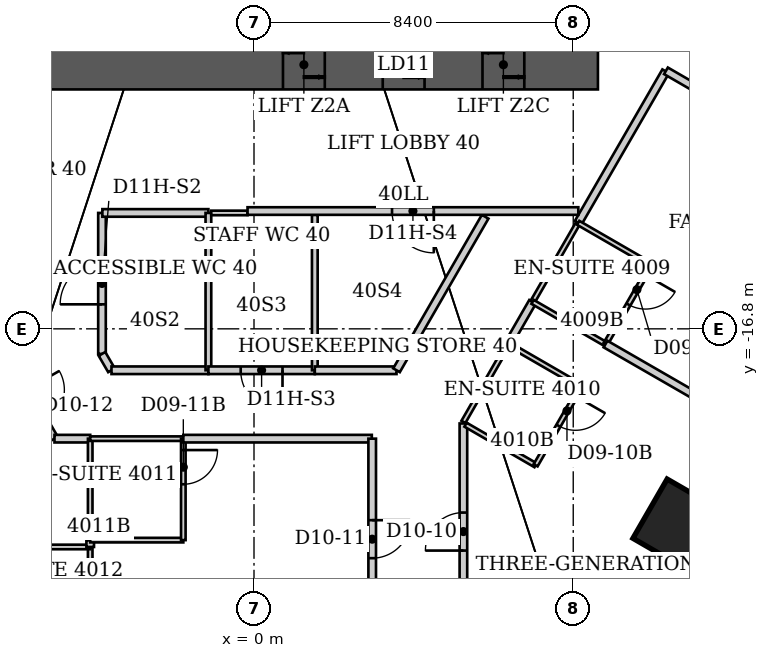
"""IFC4 building model, lengths in metres.
Left out: names, types, materials, properties, quantities, classifications, styles, units other than length and angle.
Written with IfcOpenShell. Run it as: python <this file> out.ifc"""

import sys

from ifc_helpers import new_model, si_unit, direction, frame, frame_2d, origin, origin_2d, place, context, subcontext, project, spatial, rectangle, extrude, element, fill, save


model = new_model("IFC4")
c1 = context("Model", 3, precision=1e-05, world=origin(), true_north=direction((0.0, 1.0)))
c2 = subcontext(c1, "Body", "Model", "MODEL_VIEW")
j1 = project(units=[si_unit("LENGTHUNIT", "METRE"), si_unit("PLANEANGLEUNIT", "RADIAN")], contexts=[c1])
p1 = place(None, origin())
s1 = spatial("IfcSite", under=j1, at=p1, CompositionType="ELEMENT")
p2 = place(p1, origin())
s2 = spatial("IfcBuilding", under=s1, at=p2, CompositionType="ELEMENT")
p3 = place(p2, frame((0.0, 0.0, 161.4)))
s3 = spatial("IfcBuildingStorey", under=s2, at=p3, CompositionType="ELEMENT", Elevation=161.4)
p4 = place(p3, frame((11.2, -21.983, 0.0), z_axis=(-0.025529655274, 0.050161282473, 0.998414784767), x_axis=(0.865565037486, -0.498569049576, 0.04718123236)))
e1 = element("IfcColumn", 1, at=p4, inside=s3, PredefinedType="COLUMN", context=c2, shape_type="SweptSolid", body=[
    extrude(rectangle(XDim=1.8, YDim=1.8, at=origin_2d()), origin(), (0.0, 0.0, 1.0), 3.806),
])
p5 = place(p3, frame((-9.05, -9.85, 0.0), z_axis=(0.0, 0.0, 1.0), x_axis=(1.0, 0.0, 0.0)))
e2 = element("IfcWall", 2, at=p5, inside=s3, PredefinedType="SHEAR", context=c2, shape_type="SweptSolid", body=[
    extrude(rectangle(XDim=18.1, YDim=1.3, at=frame_2d((9.05, 0.0))), origin(), (0.0, 0.0, 1.0), 3.8),
])
p6 = place(p5, frame((1.938, 0.0, 0.0)))
e3 = element("IfcOpeningElement", 3, at=p6, cuts=e2, PredefinedType="OPENING", context=c2, shape_type="SweptSolid", body=[
    extrude(rectangle(XDim=1.1, YDim=2.2, at=frame_2d((0.55, 1.1))), frame((0.0, 0.65, 0.0), z_axis=(0.0, -1.0, 0.0), x_axis=(1.0, 0.0, 0.0)), (0.0, 0.0, 1.0), 1.3),
])
p7 = place(p5, frame((9.812, 0.0, 0.0)))
e4 = element("IfcOpeningElement", 4, at=p7, cuts=e2, PredefinedType="OPENING", context=c2, shape_type="SweptSolid", body=[
    extrude(rectangle(XDim=1.1, YDim=2.1, at=frame_2d((0.55, 1.05))), frame((0.0, 0.65, 0.0), z_axis=(0.0, -1.0, 0.0), x_axis=(1.0, 0.0, 0.0)), (0.0, 0.0, 1.0), 1.3),
])
p8 = place(p5, frame((12.438, 0.0, 0.0)))
e5 = element("IfcOpeningElement", 5, at=p8, cuts=e2, PredefinedType="OPENING", context=c2, shape_type="SweptSolid", body=[
    extrude(rectangle(XDim=1.1, YDim=2.1, at=frame_2d((0.55, 1.05))), frame((0.0, 0.65, 0.0), z_axis=(0.0, -1.0, 0.0), x_axis=(1.0, 0.0, 0.0)), (0.0, 0.0, 1.0), 1.3),
])
p9 = place(p5, frame((15.062, 0.0, 0.0)))
e6 = element("IfcOpeningElement", 6, at=p9, cuts=e2, PredefinedType="OPENING", context=c2, shape_type="SweptSolid", body=[
    extrude(rectangle(XDim=1.1, YDim=2.1, at=frame_2d((0.55, 1.05))), frame((0.0, 0.65, 0.0), z_axis=(0.0, -1.0, 0.0), x_axis=(1.0, 0.0, 0.0)), (0.0, 0.0, 1.0), 1.3),
])
p10 = place(p3, frame((-6.23, -17.99, 0.0), z_axis=(0.0, 0.0, 1.0), x_axis=(0.499431599995, -0.866353321068, 0.0)))
e7 = element("IfcWall", 7, at=p10, inside=s3, PredefinedType="PARTITIONING", context=c2, shape_type="SweptSolid", body=[
    extrude(rectangle(XDim=1.962, YDim=0.2, at=frame_2d((0.981, 0.0))), origin(), (0.0, 0.0, 1.0), 3.64),
])
p11 = place(p10, frame((0.481, 0.0, 0.0)))
e8 = element("IfcOpeningElement", 8, at=p11, cuts=e7, PredefinedType="OPENING", context=c2, shape_type="SweptSolid", body=[
    extrude(rectangle(XDim=1.0, YDim=2.13, at=frame_2d((0.5, 1.065))), frame((0.0, 0.1, 0.0), z_axis=(0.0, -1.0, 0.0), x_axis=(1.0, 0.0, 0.0)), (0.0, 0.0, 1.0), 0.2),
])
p12 = place(p3, frame((-5.25, -19.69, 0.0), z_axis=(0.0, 0.0, 1.0), x_axis=(1.0, 0.0, 0.0)))
e9 = element("IfcWall", 9, at=p12, inside=s3, PredefinedType="PARTITIONING", context=c2, shape_type="SweptSolid", body=[
    extrude(rectangle(XDim=0.94, YDim=0.2, at=frame_2d((0.47, 0.0))), origin(), (0.0, 0.0, 1.0), 3.64),
])
p13 = place(p3, frame((-4.31, -24.54, 0.0), z_axis=(0.0, 0.0, 1.0), x_axis=(0.0, 1.0, 0.0)))
e10 = element("IfcWall", 10, at=p13, inside=s3, PredefinedType="PARTITIONING", context=c2, shape_type="SweptSolid", body=[
    extrude(rectangle(XDim=2.0, YDim=0.12, at=frame_2d((1.0, 0.0))), origin(), (0.0, 0.0, 1.0), 3.64),
])
p14 = place(p3, frame((-4.31, -22.54, 0.0), z_axis=(0.0, 0.0, 1.0), x_axis=(-1.0, 0.0, 0.0)))
e11 = element("IfcWall", 11, at=p14, inside=s3, PredefinedType="PARTITIONING", context=c2, shape_type="SweptSolid", body=[
    extrude(rectangle(XDim=2.4, YDim=0.12, at=frame_2d((1.2, 0.0))), origin(), (0.0, 0.0, 1.0), 3.64),
])
p15 = place(p3, frame((-4.31, -22.54, 0.0), z_axis=(0.0, 0.0, 1.0), x_axis=(0.0, 1.0, 0.0)))
e12 = element("IfcWall", 12, at=p15, inside=s3, PredefinedType="PARTITIONING", context=c2, shape_type="SweptSolid", body=[
    extrude(rectangle(XDim=0.18, YDim=0.2, at=frame_2d((0.09, 0.0))), origin(), (0.0, 0.0, 1.0), 3.64),
])
p16 = place(p3, frame((-4.31, -22.36, 0.0), z_axis=(0.0, 0.0, 1.0), x_axis=(0.0, 1.0, 0.0)))
e13 = element("IfcWall", 13, at=p16, inside=s3, PredefinedType="PARTITIONING", context=c2, shape_type="SweptSolid", body=[
    extrude(rectangle(XDim=2.67, YDim=0.12, at=frame_2d((1.335, 0.0))), origin(), (0.0, 0.0, 1.0), 3.64),
])
for number, where, z_axis, x_axis in (
    (14, (-4.31, -22.36, 0.0), (0.0, 0.0, 1.0), (1.0, 0.0, 0.0)),
    (15, (-4.31, -19.69, 0.0), (0.0, 0.0, 1.0), (1.0, 0.0, 0.0)),
):
    element("IfcWall", number, at=place(p3, frame(where, z_axis=z_axis, x_axis=x_axis)), inside=s3, PredefinedType="PARTITIONING", context=c2, shape_type="SweptSolid", body=[
        extrude(rectangle(XDim=2.45, YDim=0.12, at=frame_2d((1.225, 0.0))), origin(), (0.0, 0.0, 1.0), 3.64),
    ])
p17 = place(p3, frame((-4.0, -17.46, 0.0), z_axis=(0.0, 0.0, 1.0), x_axis=(0.0, 1.0, 0.0)))
e16 = element("IfcWall", 16, at=p17, inside=s3, PredefinedType="PARTITIONING", context=c2, shape_type="SweptSolid", body=[
    extrude(rectangle(XDim=3.71, YDim=0.2, at=frame_2d((1.855, 0.0))), origin(), (0.0, 0.0, 1.0), 3.64),
])
p18 = place(p17, frame((1.305, 0.0, 0.0)))
e17 = element("IfcOpeningElement", 17, at=p18, cuts=e16, PredefinedType="OPENING", context=c2, shape_type="SweptSolid", body=[
    extrude(rectangle(XDim=1.1, YDim=2.2, at=frame_2d((0.55, 1.1))), frame((0.0, 0.1, 0.0), z_axis=(0.0, -1.0, 0.0), x_axis=(1.0, 0.0, 0.0)), (0.0, 0.0, 1.0), 0.2),
])
p19 = place(p3, frame((-3.99, -13.75, 0.0), z_axis=(0.0, 0.0, 1.0), x_axis=(1.0, 0.0, 0.0)))
e18 = element("IfcWall", 18, at=p19, inside=s3, PredefinedType="PARTITIONING", context=c2, shape_type="SweptSolid", body=[
    extrude(rectangle(XDim=2.79, YDim=0.2, at=frame_2d((1.395, 0.0))), origin(), (0.0, 0.0, 1.0), 3.64),
])
p20 = place(p3, frame((-3.75, -17.89, 0.0), z_axis=(0.0, 0.0, 1.0), x_axis=(-0.502680181512, 0.864472460588, 0.0)))
e19 = element("IfcWall", 19, at=p20, inside=s3, PredefinedType="PARTITIONING", context=c2, shape_type="SweptSolid", body=[
    extrude(rectangle(XDim=0.497, YDim=0.2, at=frame_2d((0.249, 0.0))), origin(), (0.0, 0.0, 1.0), 3.64),
])
p21 = place(p3, frame((-1.86, -22.36, 0.0), z_axis=(0.0, 0.0, 1.0), x_axis=(0.0, 1.0, 0.0)))
e20 = element("IfcWall", 20, at=p21, inside=s3, PredefinedType="PARTITIONING", context=c2, shape_type="SweptSolid", body=[
    extrude(rectangle(XDim=2.67, YDim=0.12, at=frame_2d((1.335, 0.0))), origin(), (0.0, 0.0, 1.0), 2.86),
])
p22 = place(p21, frame((1.47, 0.0, 0.0)))
e21 = element("IfcOpeningElement", 21, at=p22, cuts=e20, PredefinedType="OPENING", context=c2, shape_type="SweptSolid", body=[
    extrude(rectangle(XDim=0.9, YDim=2.03, at=frame_2d((0.45, 1.015))), frame((0.0, 0.06, 0.0), z_axis=(0.0, -1.0, 0.0), x_axis=(1.0, 0.0, 0.0)), (0.0, 0.0, 1.0), 0.12),
])
p23 = place(p3, frame((-1.86, -19.69, 0.0), z_axis=(0.0, 0.0, 1.0), x_axis=(1.0, 0.0, 0.0)))
e22 = element("IfcWall", 22, at=p23, inside=s3, PredefinedType="PARTITIONING", context=c2, shape_type="SweptSolid", body=[
    extrude(rectangle(XDim=4.96, YDim=0.2, at=frame_2d((2.48, 0.0))), origin(), (0.0, 0.0, 1.0), 3.64),
])
p24 = place(p3, frame((-1.2, -17.89, 0.0), z_axis=(0.0, 0.0, 1.0), x_axis=(-1.0, 0.0, 0.0)))
e23 = element("IfcWall", 23, at=p24, inside=s3, PredefinedType="PARTITIONING", context=c2, shape_type="SweptSolid", body=[
    extrude(rectangle(XDim=2.55, YDim=0.2, at=frame_2d((1.275, 0.0))), origin(), (0.0, 0.0, 1.0), 3.64),
])
p25 = place(p3, frame((-1.2, -13.75, 0.0), z_axis=(0.0, 0.0, 1.0), x_axis=(0.0, -1.0, 0.0)))
e24 = element("IfcWall", 24, at=p25, inside=s3, PredefinedType="PARTITIONING", context=c2, shape_type="SweptSolid", body=[
    extrude(rectangle(XDim=4.14, YDim=0.15, at=frame_2d((2.07, 0.0))), origin(), (0.0, 0.0, 1.0), 3.64),
])
p26 = place(p3, frame((-1.125, -13.75, 0.0), z_axis=(0.0, 0.0, 1.0), x_axis=(1.0, 0.0, 0.0)))
e25 = element("IfcWall", 25, at=p26, inside=s3, PredefinedType="PARTITIONING", context=c2, shape_type="SweptSolid", body=[
    extrude(rectangle(XDim=0.955, YDim=0.12, at=frame_2d((0.478, 0.0))), origin(), (0.0, 0.0, 1.0), 3.64),
])
p27 = place(p3, frame((1.6, -17.89, 0.0), z_axis=(0.0, 0.0, 1.0), x_axis=(-1.0, 0.0, 0.0)))
e26 = element("IfcWall", 26, at=p27, inside=s3, PredefinedType="PARTITIONING", context=c2, shape_type="SweptSolid", body=[
    extrude(rectangle(XDim=2.8, YDim=0.2, at=frame_2d((1.4, 0.0))), origin(), (0.0, 0.0, 1.0), 3.64),
])
p28 = place(p27, frame((0.85, 0.0, 0.0)))
e27 = element("IfcOpeningElement", 27, at=p28, cuts=e26, PredefinedType="OPENING", context=c2, shape_type="SweptSolid", body=[
    extrude(rectangle(XDim=1.1, YDim=2.2, at=frame_2d((0.55, 1.1))), frame((0.0, 0.1, 0.0), z_axis=(0.0, -1.0, 0.0), x_axis=(1.0, 0.0, 0.0)), (0.0, 0.0, 1.0), 0.2),
])
p29 = place(p3, frame((1.6, -13.8, 0.0), z_axis=(0.0, 0.0, 1.0), x_axis=(0.0, -1.0, 0.0)))
e28 = element("IfcWall", 28, at=p29, inside=s3, PredefinedType="PARTITIONING", context=c2, shape_type="SweptSolid", body=[
    extrude(rectangle(XDim=4.09, YDim=0.15, at=frame_2d((2.045, 0.0))), origin(), (0.0, 0.0, 1.0), 3.64),
])
p30 = place(p3, frame((3.11, -19.69, 0.0), z_axis=(0.0, 0.0, 1.0), x_axis=(0.0, -1.0, 0.0)))
e29 = element("IfcWall", 29, at=p30, inside=s3, PredefinedType="PARTITIONING", context=c2, shape_type="SweptSolid", body=[
    extrude(rectangle(XDim=5.29, YDim=0.2, at=frame_2d((2.645, 0.0))), origin(), (0.0, 0.0, 1.0), 3.64),
])
p31 = place(p30, frame((2.145, 0.0, 0.0)))
e30 = element("IfcOpeningElement", 30, at=p31, cuts=e29, PredefinedType="OPENING", context=c2, shape_type="SweptSolid", body=[
    extrude(rectangle(XDim=1.0, YDim=2.13, at=frame_2d((0.5, 1.065))), frame((0.0, 0.1, 0.0), z_axis=(0.0, -1.0, 0.0), x_axis=(1.0, 0.0, 0.0)), (0.0, 0.0, 1.0), 0.2),
])
p32 = place(p3, frame((3.75, -17.89, 0.0), z_axis=(0.0, 0.0, 1.0), x_axis=(-1.0, 0.0, 0.0)))
e31 = element("IfcWall", 31, at=p32, inside=s3, PredefinedType="PARTITIONING", context=c2, shape_type="SweptSolid", body=[
    extrude(rectangle(XDim=2.15, YDim=0.2, at=frame_2d((1.075, 0.0))), origin(), (0.0, 0.0, 1.0), 3.64),
])
p33 = place(p3, frame((5.51, -24.98, 0.0), z_axis=(0.0, 0.0, 1.0), x_axis=(0.0, 1.0, 0.0)))
e32 = element("IfcWall", 32, at=p33, inside=s3, PredefinedType="PARTITIONING", context=c2, shape_type="SweptSolid", body=[
    extrude(rectangle(XDim=5.69, YDim=0.2, at=frame_2d((2.845, 0.0))), origin(), (0.0, 0.0, 1.0), 3.64),
])
p34 = place(p33, frame((2.345, 0.0, 0.0)))
e33 = element("IfcOpeningElement", 33, at=p34, cuts=e32, PredefinedType="OPENING", context=c2, shape_type="SweptSolid", body=[
    extrude(rectangle(XDim=1.0, YDim=2.13, at=frame_2d((0.5, 1.065))), frame((0.0, 0.1, 0.0), z_axis=(0.0, -1.0, 0.0), x_axis=(1.0, 0.0, 0.0)), (0.0, 0.0, 1.0), 0.2),
])
p35 = place(p3, frame((5.51, -19.25, 0.0), z_axis=(0.0, 0.0, 1.0), x_axis=(0.498837591974, 0.866695481028, 0.0)))
e34 = element("IfcWall", 34, at=p35, inside=s3, PredefinedType="PARTITIONING", context=c2, shape_type="SweptSolid", body=[
    extrude(rectangle(XDim=2.365, YDim=0.12, at=frame_2d((1.183, 0.0))), origin(), (0.0, 0.0, 1.0), 3.64),
])
p36 = place(p3, frame((5.566, -19.323, 0.0), z_axis=(0.0, 0.0, 1.0), x_axis=(0.865436746432, -0.501018201192, 0.0)))
e35 = element("IfcWall", 35, at=p36, inside=s3, PredefinedType="PARTITIONING", context=c2, shape_type="SweptSolid", body=[
    extrude(rectangle(XDim=2.13, YDim=0.12, at=frame_2d((1.065, 0.0))), origin(), (0.0, 0.0, 1.0), 3.64),
])
p37 = place(p3, frame((6.083, -13.85, 0.0), z_axis=(0.0, 0.0, 1.0), x_axis=(-0.499977643516, -0.866038310922, 0.0)))
e36 = element("IfcWall", 36, at=p37, inside=s3, PredefinedType="PARTITIONING", context=c2, shape_type="SweptSolid", body=[
    extrude(rectangle(XDim=4.665, YDim=0.2, at=frame_2d((2.333, 0.0))), origin(), (0.0, 0.0, 1.0), 3.64),
])
p38 = place(p3, frame((6.69, -17.2, 0.0), z_axis=(0.0, 0.0, 1.0), x_axis=(0.499623473928, 0.866242682105, 0.0)))
e37 = element("IfcWall", 37, at=p38, inside=s3, PredefinedType="PARTITIONING", context=c2, shape_type="SweptSolid", body=[
    extrude(rectangle(XDim=1.281, YDim=0.2, at=frame_2d((0.641, 0.0))), origin(), (0.0, 0.0, 1.0), 3.64),
])
p39 = place(p3, frame((7.33, -16.09, 0.0), z_axis=(0.0, 0.0, 1.0), x_axis=(0.499693115345, 0.866202511239, 0.0)))
e38 = element("IfcWall", 38, at=p39, inside=s3, PredefinedType="PARTITIONING", context=c2, shape_type="SweptSolid", body=[
    extrude(rectangle(XDim=2.401, YDim=0.12, at=frame_2d((1.201, 0.0))), origin(), (0.0, 0.0, 1.0), 3.64),
])
p40 = place(p3, frame((7.33, -16.09, 0.0), z_axis=(0.0, 0.0, 1.0), x_axis=(0.86575271903, -0.500472006703, 0.0)))
e39 = element("IfcWall", 39, at=p40, inside=s3, PredefinedType="PARTITIONING", context=c2, shape_type="SweptSolid", body=[
    extrude(rectangle(XDim=2.218, YDim=0.12, at=frame_2d((1.109, 0.0))), origin(), (0.0, 0.0, 1.0), 3.64),
])
p41 = place(p3, frame((7.41, -20.39, 0.0), z_axis=(0.0, 0.0, 1.0), x_axis=(0.499737123639, 0.866177122335, 0.0)))
e40 = element("IfcWall", 40, at=p41, inside=s3, PredefinedType="PARTITIONING", context=c2, shape_type="SweptSolid", body=[
    extrude(rectangle(XDim=2.401, YDim=0.12, at=frame_2d((1.201, 0.0))), origin(), (0.0, 0.0, 1.0), 3.64),
])
p42 = place(p41, frame((1.201, 0.0, 0.0)))
e41 = element("IfcOpeningElement", 41, at=p42, cuts=e40, PredefinedType="OPENING", context=c2, shape_type="SweptSolid", body=[
    extrude(rectangle(XDim=0.9, YDim=2.03, at=frame_2d((0.45, 1.015))), frame((0.0, 0.06, 0.0), z_axis=(0.0, -1.0, 0.0), x_axis=(1.0, 0.0, 0.0)), (0.0, 0.0, 1.0), 0.12),
])
p43 = place(p3, frame((8.53, -14.01, 0.0), z_axis=(0.0, 0.0, 1.0), x_axis=(0.500091179446, 0.865972754907, 0.0)))
e42 = element("IfcWall", 42, at=p43, inside=s3, PredefinedType="PARTITIONING", context=c2, shape_type="SweptSolid", body=[
    extrude(rectangle(XDim=4.604, YDim=0.2, at=frame_2d((2.302, 0.0))), origin(), (0.0, 0.0, 1.0), 3.64),
])
p44 = place(p3, frame((8.534, -13.7, 0.0), z_axis=(0.0, 0.0, 1.0), x_axis=(-1.0, 0.0, 0.0)))
e43 = element("IfcWall", 43, at=p44, inside=s3, PredefinedType="PARTITIONING", context=c2, shape_type="SweptSolid", body=[
    extrude(rectangle(XDim=8.704, YDim=0.2, at=frame_2d((4.352, 0.0))), origin(), (0.0, 0.0, 1.0), 3.64),
])
p45 = place(p44, frame((3.802, 0.0, 0.0)))
e44 = element("IfcOpeningElement", 44, at=p45, cuts=e43, PredefinedType="OPENING", context=c2, shape_type="SweptSolid", body=[
    extrude(rectangle(XDim=1.1, YDim=2.2, at=frame_2d((0.55, 1.1))), frame((0.0, 0.1, 0.0), z_axis=(0.0, -1.0, 0.0), x_axis=(1.0, 0.0, 0.0)), (0.0, 0.0, 1.0), 0.2),
])
p46 = place(p3, frame((8.61, -18.31, 0.0), z_axis=(0.0, 0.0, 1.0), x_axis=(-0.865732595383, 0.500506816428, 0.0)))
e45 = element("IfcWall", 45, at=p46, inside=s3, PredefinedType="PARTITIONING", context=c2, shape_type="SweptSolid", body=[
    extrude(rectangle(XDim=2.218, YDim=0.12, at=frame_2d((1.109, 0.0))), origin(), (0.0, 0.0, 1.0), 3.64),
])
p47 = place(p3, frame((9.25, -17.2, 0.0), z_axis=(0.0, 0.0, 1.0), x_axis=(0.499737123639, 0.866177122335, 0.0)))
e46 = element("IfcWall", 46, at=p47, inside=s3, PredefinedType="PARTITIONING", context=c2, shape_type="SweptSolid", body=[
    extrude(rectangle(XDim=2.401, YDim=0.12, at=frame_2d((1.201, 0.0))), origin(), (0.0, 0.0, 1.0), 3.64),
])
p48 = place(p47, frame((1.201, 0.0, 0.0)))
e47 = element("IfcOpeningElement", 47, at=p48, cuts=e46, PredefinedType="OPENING", context=c2, shape_type="SweptSolid", body=[
    extrude(rectangle(XDim=0.9, YDim=2.03, at=frame_2d((0.45, 1.015))), frame((0.0, 0.06, 0.0), z_axis=(0.0, -1.0, 0.0), x_axis=(1.0, 0.0, 0.0)), (0.0, 0.0, 1.0), 0.12),
])
p49 = place(p3, frame((9.25, -17.2, 0.0), z_axis=(0.0, 0.0, 1.0), x_axis=(0.866353281607, -0.499431668448, 0.0)))
e48 = element("IfcWall", 48, at=p49, inside=s3, PredefinedType="PARTITIONING", context=c2, shape_type="SweptSolid", body=[
    extrude(rectangle(XDim=5.767, YDim=0.2, at=frame_2d((2.883, 0.0))), origin(), (0.0, 0.0, 1.0), 3.64),
])
p50 = place(p3, frame((10.45, -15.12, 0.0), z_axis=(0.0, 0.0, 1.0), x_axis=(-0.865705017107, 0.500554515868, 0.0)))
e49 = element("IfcWall", 49, at=p50, inside=s3, PredefinedType="PARTITIONING", context=c2, shape_type="SweptSolid", body=[
    extrude(rectangle(XDim=2.218, YDim=0.12, at=frame_2d((1.109, 0.0))), origin(), (0.0, 0.0, 1.0), 3.64),
])
p51 = place(p3, frame((10.84, -10.01, 0.0), z_axis=(0.0, 0.0, 1.0), x_axis=(0.865552592802, -0.500818039904, 0.0)))
e50 = element("IfcWall", 50, at=p51, inside=s3, PredefinedType="PARTITIONING", context=c2, shape_type="SweptSolid", body=[
    extrude(rectangle(XDim=5.072, YDim=0.2, at=frame_2d((2.536, 0.0))), origin(), (0.0, 0.0, 1.0), 3.64),
])
p52 = place(p51, frame((2.036, 0.0, 0.0)))
e51 = element("IfcOpeningElement", 51, at=p52, cuts=e50, PredefinedType="OPENING", context=c2, shape_type="SweptSolid", body=[
    extrude(rectangle(XDim=1.0, YDim=2.13, at=frame_2d((0.5, 1.065))), frame((0.0, 0.1, 0.0), z_axis=(0.0, -1.0, 0.0), x_axis=(1.0, 0.0, 0.0)), (0.0, 0.0, 1.0), 0.2),
])
p53 = place(p48, origin())
e52 = element("IfcDoor", 52, at=p53, inside=s3, OperationType="SINGLE_SWING_RIGHT", PredefinedType="DOOR", context=c2, shape_type="SweptSolid", body=[
    extrude(rectangle(XDim=0.9, YDim=2.03, at=frame_2d((0.45, 1.015))), frame((0.0, 0.025, 0.0), z_axis=(0.0, -1.0, 0.0), x_axis=(1.0, 0.0, 0.0)), (0.0, 0.0, 1.0), 0.05),
])
fill(e47, e52)
p54 = place(p34, origin())
e53 = element("IfcDoor", 53, at=p54, inside=s3, OperationType="SINGLE_SWING_LEFT", PredefinedType="DOOR", context=c2, shape_type="SweptSolid", body=[
    extrude(rectangle(XDim=1.0, YDim=2.13, at=frame_2d((0.5, 1.065))), frame((0.0, 0.025, 0.0), z_axis=(0.0, -1.0, 0.0), x_axis=(1.0, 0.0, 0.0)), (0.0, 0.0, 1.0), 0.05),
])
fill(e33, e53)
p55 = place(p42, origin())
e54 = element("IfcDoor", 54, at=p55, inside=s3, OperationType="SINGLE_SWING_RIGHT", PredefinedType="DOOR", context=c2, shape_type="SweptSolid", body=[
    extrude(rectangle(XDim=0.9, YDim=2.03, at=frame_2d((0.45, 1.015))), frame((0.0, 0.025, 0.0), z_axis=(0.0, -1.0, 0.0), x_axis=(1.0, 0.0, 0.0)), (0.0, 0.0, 1.0), 0.05),
])
fill(e41, e54)
p56 = place(p31, origin())
e55 = element("IfcDoor", 55, at=p56, inside=s3, OperationType="SINGLE_SWING_LEFT", PredefinedType="DOOR", context=c2, shape_type="SweptSolid", body=[
    extrude(rectangle(XDim=1.0, YDim=2.13, at=frame_2d((0.5, 1.065))), frame((0.0, 0.025, 0.0), z_axis=(0.0, -1.0, 0.0), x_axis=(1.0, 0.0, 0.0)), (0.0, 0.0, 1.0), 0.05),
])
fill(e30, e55)
p57 = place(p22, origin())
e56 = element("IfcDoor", 56, at=p57, inside=s3, OperationType="SINGLE_SWING_RIGHT", PredefinedType="DOOR", context=c2, shape_type="SweptSolid", body=[
    extrude(rectangle(XDim=0.9, YDim=2.03, at=frame_2d((0.45, 1.015))), frame((0.0, 0.025, 0.0), z_axis=(0.0, -1.0, 0.0), x_axis=(1.0, 0.0, 0.0)), (0.0, 0.0, 1.0), 0.05),
])
fill(e21, e56)
p58 = place(p18, origin())
e57 = element("IfcDoor", 57, at=p58, inside=s3, OperationType="SINGLE_SWING_LEFT", PredefinedType="DOOR", context=c2, shape_type="SweptSolid", body=[
    extrude(rectangle(XDim=1.1, YDim=2.2, at=frame_2d((0.55, 1.1))), frame((0.0, 0.025, 0.0), z_axis=(0.0, -1.0, 0.0), x_axis=(1.0, 0.0, 0.0)), (0.0, 0.0, 1.0), 0.05),
])
fill(e17, e57)
p59 = place(p28, origin())
e58 = element("IfcDoor", 58, at=p59, inside=s3, OperationType="SINGLE_SWING_LEFT", PredefinedType="DOOR", context=c2, shape_type="SweptSolid", body=[
    extrude(rectangle(XDim=1.1, YDim=2.2, at=frame_2d((0.55, 1.1))), frame((0.0, 0.025, 0.0), z_axis=(0.0, -1.0, 0.0), x_axis=(1.0, 0.0, 0.0)), (0.0, 0.0, 1.0), 0.05),
])
fill(e27, e58)
p60 = place(p45, origin())
e59 = element("IfcDoor", 59, at=p60, inside=s3, OperationType="SINGLE_SWING_LEFT", PredefinedType="DOOR", context=c2, shape_type="SweptSolid", body=[
    extrude(rectangle(XDim=1.1, YDim=2.2, at=frame_2d((0.55, 1.1))), frame((0.0, 0.025, 0.0), z_axis=(0.0, -1.0, 0.0), x_axis=(1.0, 0.0, 0.0)), (0.0, 0.0, 1.0), 0.05),
])
fill(e44, e59)
p61 = place(p7, origin())
e60 = element("IfcDoor", 60, at=p61, inside=s3, OperationType="DOUBLE_DOOR_SLIDING", PredefinedType="DOOR", context=c2, shape_type="SweptSolid", body=[
    extrude(rectangle(XDim=1.1, YDim=2.1, at=frame_2d((0.55, 1.05))), frame((0.0, 0.025, 0.0), z_axis=(0.0, -1.0, 0.0), x_axis=(1.0, 0.0, 0.0)), (0.0, 0.0, 1.0), 0.05),
])
fill(e4, e60)
p62 = place(p8, origin())
e61 = element("IfcDoor", 61, at=p62, inside=s3, OperationType="DOUBLE_DOOR_SLIDING", PredefinedType="DOOR", context=c2, shape_type="SweptSolid", body=[
    extrude(rectangle(XDim=1.1, YDim=2.1, at=frame_2d((0.55, 1.05))), frame((0.0, 0.025, 0.0), z_axis=(0.0, -1.0, 0.0), x_axis=(1.0, 0.0, 0.0)), (0.0, 0.0, 1.0), 0.05),
])
fill(e5, e61)
p63 = place(p9, origin())
e62 = element("IfcDoor", 62, at=p63, inside=s3, OperationType="DOUBLE_DOOR_SLIDING", PredefinedType="DOOR", context=c2, shape_type="SweptSolid", body=[
    extrude(rectangle(XDim=1.1, YDim=2.1, at=frame_2d((0.55, 1.05))), frame((0.0, 0.025, 0.0), z_axis=(0.0, -1.0, 0.0), x_axis=(1.0, 0.0, 0.0)), (0.0, 0.0, 1.0), 0.05),
])
fill(e6, e62)
save(model, sys.argv[1])
